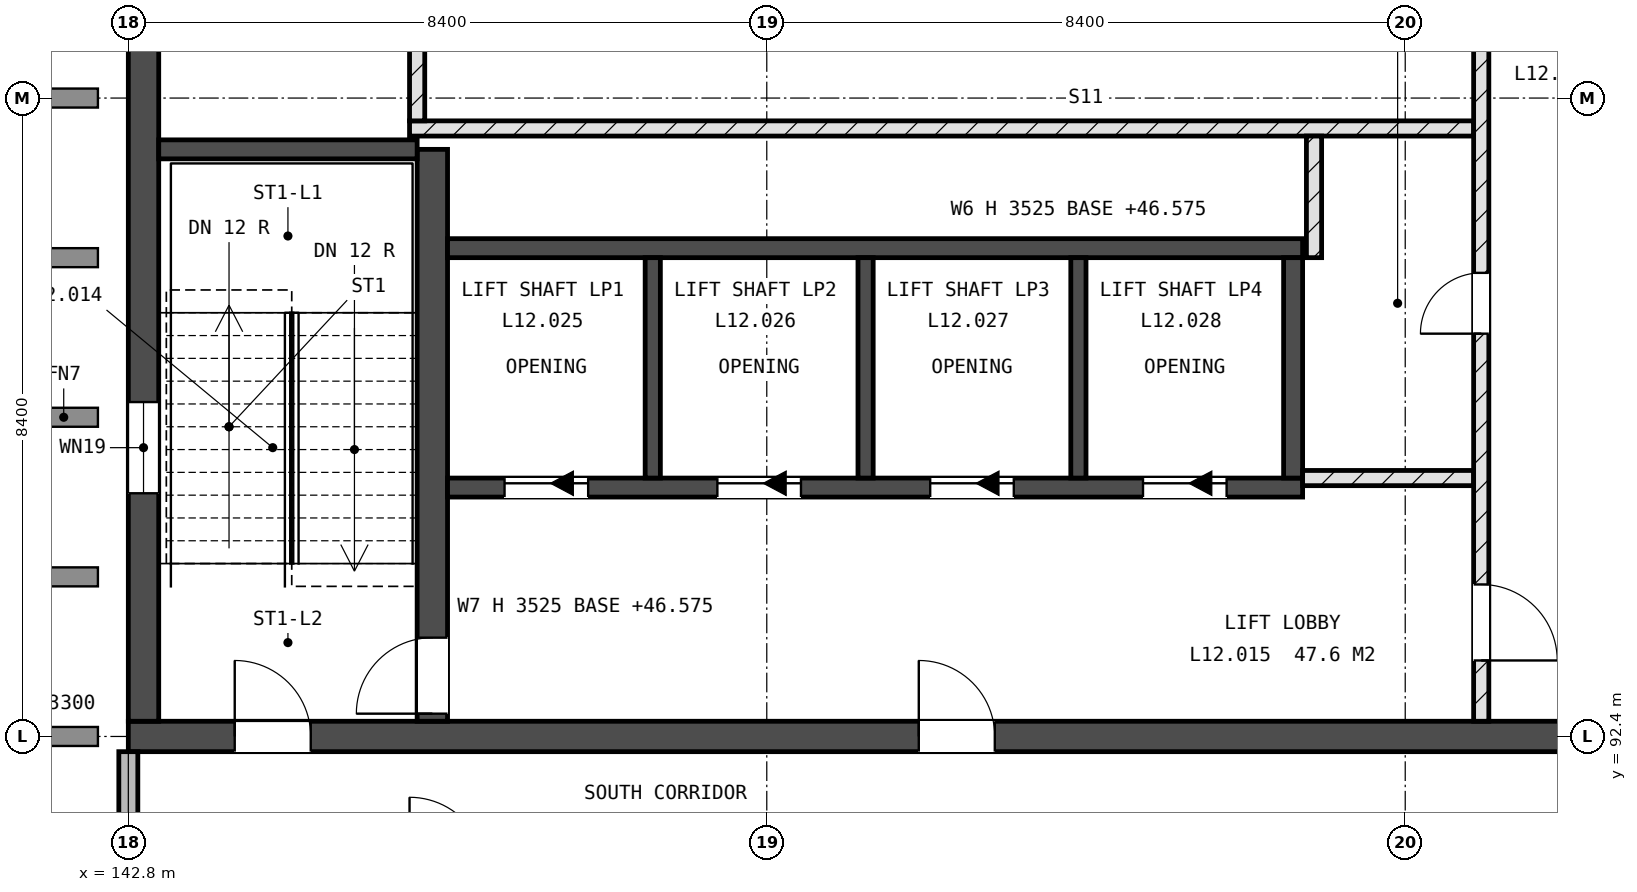
"""IFC4 building model, lengths in metres.
Left out: names, types, materials, properties, quantities, classifications, styles, units other than length and angle.
Written with IfcOpenShell. Run it as: python <this file> out.ifc"""

import sys

from ifc_helpers import new_model, si_unit, direction, frame, frame_2d, origin, place, context, subcontext, project, spatial, rectangle, extrude, element, fill, save


model = new_model("IFC4")
c1 = context("Model", 3, precision=1e-05, world=origin(), true_north=direction((0.0, 1.0)))
c2 = subcontext(c1, "Body", "Model", "MODEL_VIEW")
j1 = project(units=[si_unit("LENGTHUNIT", "METRE"), si_unit("PLANEANGLEUNIT", "RADIAN")], contexts=[c1])
p1 = place(None, origin())
s1 = spatial("IfcSite", under=j1, at=p1, CompositionType="ELEMENT")
p2 = place(p1, origin())
s2 = spatial("IfcBuilding", under=s1, at=p2, CompositionType="ELEMENT")
p3 = place(p2, frame((0.0, 0.0, 46.8)))
s3 = spatial("IfcBuildingStorey", under=s2, at=p3, CompositionType="ELEMENT", Elevation=46.8)
p4 = place(p3, frame((142.8, 92.4, -0.225), z_axis=(0.0, 0.0, 1.0), x_axis=(1.0, 0.0, 0.0)))
e1 = element("IfcWall", 1, at=p4, inside=s3, PredefinedType="SHEAR", context=c2, shape_type="SweptSolid", body=[
    extrude(rectangle(XDim=25.2, YDim=0.4, at=frame_2d((12.6, 0.0))), origin(), (0.0, 0.0, 1.0), 3.525),
])
p5 = place(p4, frame((1.4, 0.0, 0.225)))
e2 = element("IfcOpeningElement", 2, at=p5, cuts=e1, PredefinedType="OPENING", context=c2, shape_type="SweptSolid", body=[
    extrude(rectangle(XDim=1.0, YDim=2.1, at=frame_2d((0.5, 1.05))), frame((0.0, 0.21, 0.0), z_axis=(0.0, -1.0, 0.0), x_axis=(1.0, 0.0, 0.0)), (0.0, 0.0, 1.0), 0.42),
])
p6 = place(p4, frame((19.1, 0.0, 0.225)))
e3 = element("IfcOpeningElement", 3, at=p6, cuts=e1, PredefinedType="OPENING", context=c2, shape_type="SweptSolid", body=[
    extrude(rectangle(XDim=1.0, YDim=2.1, at=frame_2d((0.5, 1.05))), frame((0.0, 0.21, 0.0), z_axis=(0.0, -1.0, 0.0), x_axis=(1.0, 0.0, 0.0)), (0.0, 0.0, 1.0), 0.42),
])
p7 = place(p4, frame((10.4, 0.0, 0.225)))
e4 = element("IfcOpeningElement", 4, at=p7, cuts=e1, PredefinedType="OPENING", context=c2, shape_type="SweptSolid", body=[
    extrude(rectangle(XDim=1.0, YDim=2.1, at=frame_2d((0.5, 1.05))), frame((0.0, 0.21, 0.0), z_axis=(0.0, -1.0, 0.0), x_axis=(1.0, 0.0, 0.0)), (0.0, 0.0, 1.0), 0.42),
])
p8 = place(p3, frame((143.0, 92.6, -0.225), z_axis=(0.0, 0.0, 1.0), x_axis=(0.0, 1.0, 0.0)))
e5 = element("IfcWall", 5, at=p8, inside=s3, PredefinedType="SHEAR", context=c2, shape_type="SweptSolid", body=[
    extrude(rectangle(XDim=16.4, YDim=0.4, at=frame_2d((8.2, 0.0))), origin(), (0.0, 0.0, 1.0), 3.525),
])
p9 = place(p8, frame((3.0, 0.0, 1.825)))
e6 = element("IfcOpeningElement", 6, at=p9, cuts=e5, PredefinedType="OPENING", context=c2, shape_type="SweptSolid", body=[
    extrude(rectangle(XDim=1.2, YDim=0.9, at=frame_2d((0.6, 0.45))), frame((0.0, 0.21, 0.0), z_axis=(0.0, -1.0, 0.0), x_axis=(1.0, 0.0, 0.0)), (0.0, 0.0, 1.0), 0.42),
])
p10 = place(p3, frame((146.8, 92.6, -0.225), z_axis=(0.0, 0.0, 1.0), x_axis=(0.0, 1.0, 0.0)))
e7 = element("IfcWall", 7, at=p10, inside=s3, PredefinedType="SHEAR", context=c2, shape_type="SweptSolid", body=[
    extrude(rectangle(XDim=7.525, YDim=0.4, at=frame_2d((3.762, 0.0))), origin(), (0.0, 0.0, 1.0), 3.525),
])
p11 = place(p10, frame((0.1, 0.0, 0.225)))
e8 = element("IfcOpeningElement", 8, at=p11, cuts=e7, PredefinedType="OPENING", context=c2, shape_type="SweptSolid", body=[
    extrude(rectangle(XDim=1.0, YDim=2.1, at=frame_2d((0.5, 1.05))), frame((0.0, 0.21, 0.0), z_axis=(0.0, -1.0, 0.0), x_axis=(1.0, 0.0, 0.0)), (0.0, 0.0, 1.0), 0.42),
])
p12 = place(p3, frame((143.2, 100.125, -0.225), z_axis=(0.0, 0.0, 1.0), x_axis=(1.0, 0.0, 0.0)))
e9 = element("IfcWall", 9, at=p12, inside=s3, PredefinedType="SHEAR", context=c2, shape_type="SweptSolid", body=[
    extrude(rectangle(XDim=3.4, YDim=0.25, at=frame_2d((1.7, 0.0))), origin(), (0.0, 0.0, 1.0), 3.525),
])
p13 = place(p3, frame((147.0, 95.675, -0.225), z_axis=(0.0, 0.0, 1.0), x_axis=(1.0, 0.0, 0.0)))
e10 = element("IfcWall", 10, at=p13, inside=s3, PredefinedType="SHEAR", context=c2, shape_type="SweptSolid", body=[
    extrude(rectangle(XDim=11.25, YDim=0.25, at=frame_2d((5.625, 0.0))), origin(), (0.0, 0.0, 1.0), 3.525),
])
p14 = place(p13, frame((0.75, 0.0, 0.225)))
e11 = element("IfcOpeningElement", 11, at=p14, cuts=e10, PredefinedType="OPENING", context=c2, shape_type="SweptSolid", body=[
    extrude(rectangle(XDim=1.1, YDim=2.1, at=frame_2d((0.55, 1.05))), frame((0.0, 0.135, 0.0), z_axis=(0.0, -1.0, 0.0), x_axis=(1.0, 0.0, 0.0)), (0.0, 0.0, 1.0), 0.27),
])
p15 = place(p13, frame((3.55, 0.0, 0.225)))
e12 = element("IfcOpeningElement", 12, at=p15, cuts=e10, PredefinedType="OPENING", context=c2, shape_type="SweptSolid", body=[
    extrude(rectangle(XDim=1.1, YDim=2.1, at=frame_2d((0.55, 1.05))), frame((0.0, 0.135, 0.0), z_axis=(0.0, -1.0, 0.0), x_axis=(1.0, 0.0, 0.0)), (0.0, 0.0, 1.0), 0.27),
])
p16 = place(p13, frame((6.35, 0.0, 0.225)))
e13 = element("IfcOpeningElement", 13, at=p16, cuts=e10, PredefinedType="OPENING", context=c2, shape_type="SweptSolid", body=[
    extrude(rectangle(XDim=1.1, YDim=2.1, at=frame_2d((0.55, 1.05))), frame((0.0, 0.135, 0.0), z_axis=(0.0, -1.0, 0.0), x_axis=(1.0, 0.0, 0.0)), (0.0, 0.0, 1.0), 0.27),
])
p17 = place(p13, frame((9.15, 0.0, 0.225)))
e14 = element("IfcOpeningElement", 14, at=p17, cuts=e10, PredefinedType="OPENING", context=c2, shape_type="SweptSolid", body=[
    extrude(rectangle(XDim=1.1, YDim=2.1, at=frame_2d((0.55, 1.05))), frame((0.0, 0.135, 0.0), z_axis=(0.0, -1.0, 0.0), x_axis=(1.0, 0.0, 0.0)), (0.0, 0.0, 1.0), 0.27),
])
p18 = place(p3, frame((147.0, 98.825, -0.225), z_axis=(0.0, 0.0, 1.0), x_axis=(1.0, 0.0, 0.0)))
e15 = element("IfcWall", 15, at=p18, inside=s3, PredefinedType="SHEAR", context=c2, shape_type="SweptSolid", body=[
    extrude(rectangle(XDim=11.25, YDim=0.25, at=frame_2d((5.625, 0.0))), origin(), (0.0, 0.0, 1.0), 3.525),
])
p19 = place(p3, frame((158.125, 95.8, -0.225), z_axis=(0.0, 0.0, 1.0), x_axis=(0.0, 1.0, 0.0)))
e16 = element("IfcWall", 16, at=p19, inside=s3, PredefinedType="SHEAR", context=c2, shape_type="SweptSolid", body=[
    extrude(rectangle(XDim=2.9, YDim=0.25, at=frame_2d((1.45, 0.0))), origin(), (0.0, 0.0, 1.0), 3.525),
])
for number, where, z_axis, x_axis in (
    (17, (149.7, 95.8, -0.225), (0.0, 0.0, 1.0), (0.0, 1.0, 0.0)),
    (18, (152.5, 95.8, -0.225), (0.0, 0.0, 1.0), (0.0, 1.0, 0.0)),
    (19, (155.3, 95.8, -0.225), (0.0, 0.0, 1.0), (0.0, 1.0, 0.0)),
):
    element("IfcWall", number, at=place(p3, frame(where, z_axis=z_axis, x_axis=x_axis)), inside=s3, PredefinedType="SHEAR", context=c2, shape_type="SweptSolid", body=[
        extrude(rectangle(XDim=2.9, YDim=0.2, at=frame_2d((1.45, 0.0))), origin(), (0.0, 0.0, 1.0), 3.525),
    ])
p20 = place(p3, frame((142.8, 84.4, 0.0), z_axis=(0.0, 0.0, 1.0), x_axis=(0.0, 1.0, 0.0)))
e20 = element("IfcWall", 20, at=p20, inside=s3, PredefinedType="STANDARD", context=c2, shape_type="SweptSolid", body=[
    extrude(rectangle(XDim=7.8, YDim=0.25, at=frame_2d((3.9, 0.0))), origin(), (0.0, 0.0, 1.0), 3.3),
])
p21 = place(p20, frame((2.3, 0.0, 2.1)))
e21 = element("IfcOpeningElement", 21, at=p21, cuts=e20, PredefinedType="OPENING", context=c2, shape_type="SweptSolid", body=[
    extrude(rectangle(XDim=0.9, YDim=0.6, at=frame_2d((0.45, 0.3))), frame((0.0, 0.135, 0.0), z_axis=(0.0, -1.0, 0.0), x_axis=(1.0, 0.0, 0.0)), (0.0, 0.0, 1.0), 0.27),
])
p22 = place(p3, frame((158.25, 95.8, 0.0), z_axis=(0.0, 0.0, 1.0), x_axis=(1.0, 0.0, 0.0)))
e22 = element("IfcWall", 22, at=p22, inside=s3, PredefinedType="SOLIDWALL", context=c2, shape_type="SweptSolid", body=[
    extrude(rectangle(XDim=2.25, YDim=0.2, at=frame_2d((1.125, 0.0))), origin(), (0.0, 0.0, 1.0), 3.3),
])
p23 = place(p3, frame((146.5, 100.4, 0.0), z_axis=(0.0, 0.0, 1.0), x_axis=(1.0, 0.0, 0.0)))
e23 = element("IfcWall", 23, at=p23, inside=s3, PredefinedType="SOLIDWALL", context=c2, shape_type="SweptSolid", body=[
    extrude(rectangle(XDim=14.0, YDim=0.2, at=frame_2d((7.0, 0.0))), origin(), (0.0, 0.0, 1.0), 3.3),
])
p24 = place(p3, frame((146.6, 100.5, 0.0), z_axis=(0.0, 0.0, 1.0), x_axis=(0.0, 1.0, 0.0)))
e24 = element("IfcWall", 24, at=p24, inside=s3, PredefinedType="SOLIDWALL", context=c2, shape_type="SweptSolid", body=[
    extrude(rectangle(XDim=5.3, YDim=0.2, at=frame_2d((2.65, 0.0))), origin(), (0.0, 0.0, 1.0), 3.3),
])
p25 = place(p24, frame((1.8, 0.0, 0.0)))
e25 = element("IfcOpeningElement", 25, at=p25, cuts=e24, PredefinedType="OPENING", context=c2, shape_type="SweptSolid", body=[
    extrude(rectangle(XDim=1.0, YDim=2.1, at=frame_2d((0.5, 1.05))), frame((0.0, 0.11, 0.0), z_axis=(0.0, -1.0, 0.0), x_axis=(1.0, 0.0, 0.0)), (0.0, 0.0, 1.0), 0.22),
])
p26 = place(p3, frame((158.4, 98.7, 0.0), z_axis=(0.0, 0.0, 1.0), x_axis=(0.0, 1.0, 0.0)))
e26 = element("IfcWall", 26, at=p26, inside=s3, PredefinedType="SOLIDWALL", context=c2, shape_type="SweptSolid", body=[
    extrude(rectangle(XDim=1.6, YDim=0.2, at=frame_2d((0.8, 0.0))), origin(), (0.0, 0.0, 1.0), 3.3),
])
p27 = place(p3, frame((160.6, 92.6, 0.0), z_axis=(0.0, 0.0, 1.0), x_axis=(0.0, 1.0, 0.0)))
e27 = element("IfcWall", 27, at=p27, inside=s3, PredefinedType="SOLIDWALL", context=c2, shape_type="SweptSolid", body=[
    extrude(rectangle(XDim=12.5, YDim=0.2, at=frame_2d((6.25, 0.0))), origin(), (0.0, 0.0, 1.0), 3.3),
])
p28 = place(p27, frame((5.1, 0.0, 0.0)))
e28 = element("IfcOpeningElement", 28, at=p28, cuts=e27, PredefinedType="OPENING", context=c2, shape_type="SweptSolid", body=[
    extrude(rectangle(XDim=0.8, YDim=2.1, at=frame_2d((0.4, 1.05))), frame((0.0, 0.11, 0.0), z_axis=(0.0, -1.0, 0.0), x_axis=(1.0, 0.0, 0.0)), (0.0, 0.0, 1.0), 0.22),
])
p29 = place(p27, frame((0.8, 0.0, 0.0)))
e29 = element("IfcOpeningElement", 29, at=p29, cuts=e27, PredefinedType="OPENING", context=c2, shape_type="SweptSolid", body=[
    extrude(rectangle(XDim=1.0, YDim=2.1, at=frame_2d((0.5, 1.05))), frame((0.0, 0.11, 0.0), z_axis=(0.0, -1.0, 0.0), x_axis=(1.0, 0.0, 0.0)), (0.0, 0.0, 1.0), 0.22),
])
p30 = place(p9, origin())
e30 = element("IfcWindow", 30, at=p30, inside=s3, PartitioningType="SINGLE_PANEL", PredefinedType="WINDOW", context=c2, shape_type="SweptSolid", body=[
    extrude(rectangle(XDim=1.2, YDim=0.9, at=frame_2d((0.6, 0.45))), frame((0.0, 0.03, 0.0), z_axis=(0.0, -1.0, 0.0), x_axis=(1.0, 0.0, 0.0)), (0.0, 0.0, 1.0), 0.06),
])
fill(e6, e30)
p31 = place(p14, origin())
e31 = element("IfcDoor", 31, at=p31, inside=s3, OperationType="SLIDING_TO_LEFT", PredefinedType="DOOR", context=c2, shape_type="SweptSolid", body=[
    extrude(rectangle(XDim=1.1, YDim=2.1, at=frame_2d((0.55, 1.05))), frame((0.0, 0.025, 0.0), z_axis=(0.0, -1.0, 0.0), x_axis=(1.0, 0.0, 0.0)), (0.0, 0.0, 1.0), 0.05),
])
fill(e11, e31)
p32 = place(p15, origin())
e32 = element("IfcDoor", 32, at=p32, inside=s3, OperationType="SLIDING_TO_LEFT", PredefinedType="DOOR", context=c2, shape_type="SweptSolid", body=[
    extrude(rectangle(XDim=1.1, YDim=2.1, at=frame_2d((0.55, 1.05))), frame((0.0, 0.025, 0.0), z_axis=(0.0, -1.0, 0.0), x_axis=(1.0, 0.0, 0.0)), (0.0, 0.0, 1.0), 0.05),
])
fill(e12, e32)
p33 = place(p16, origin())
e33 = element("IfcDoor", 33, at=p33, inside=s3, OperationType="SLIDING_TO_LEFT", PredefinedType="DOOR", context=c2, shape_type="SweptSolid", body=[
    extrude(rectangle(XDim=1.1, YDim=2.1, at=frame_2d((0.55, 1.05))), frame((0.0, 0.025, 0.0), z_axis=(0.0, -1.0, 0.0), x_axis=(1.0, 0.0, 0.0)), (0.0, 0.0, 1.0), 0.05),
])
fill(e13, e33)
p34 = place(p17, origin())
e34 = element("IfcDoor", 34, at=p34, inside=s3, OperationType="SLIDING_TO_LEFT", PredefinedType="DOOR", context=c2, shape_type="SweptSolid", body=[
    extrude(rectangle(XDim=1.1, YDim=2.1, at=frame_2d((0.55, 1.05))), frame((0.0, 0.025, 0.0), z_axis=(0.0, -1.0, 0.0), x_axis=(1.0, 0.0, 0.0)), (0.0, 0.0, 1.0), 0.05),
])
fill(e14, e34)
p35 = place(p5, origin())
e35 = element("IfcDoor", 35, at=p35, inside=s3, OperationType="SINGLE_SWING_RIGHT", PredefinedType="DOOR", context=c2, shape_type="SweptSolid", body=[
    extrude(rectangle(XDim=1.0, YDim=2.1, at=frame_2d((0.5, 1.05))), frame((0.0, 0.025, 0.0), z_axis=(0.0, -1.0, 0.0), x_axis=(1.0, 0.0, 0.0)), (0.0, 0.0, 1.0), 0.05),
])
fill(e2, e35)
p36 = place(p11, origin())
e36 = element("IfcDoor", 36, at=p36, inside=s3, OperationType="SINGLE_SWING_RIGHT", PredefinedType="DOOR", context=c2, shape_type="SweptSolid", body=[
    extrude(rectangle(XDim=1.0, YDim=2.1, at=frame_2d((0.5, 1.05))), frame((0.0, 0.025, 0.0), z_axis=(0.0, -1.0, 0.0), x_axis=(1.0, 0.0, 0.0)), (0.0, 0.0, 1.0), 0.05),
])
fill(e8, e36)
p37 = place(p28, origin())
e37 = element("IfcDoor", 37, at=p37, inside=s3, OperationType="SINGLE_SWING_RIGHT", PredefinedType="DOOR", context=c2, shape_type="SweptSolid", body=[
    extrude(rectangle(XDim=0.8, YDim=2.1, at=frame_2d((0.4, 1.05))), frame((0.0, 0.025, 0.0), z_axis=(0.0, -1.0, 0.0), x_axis=(1.0, 0.0, 0.0)), (0.0, 0.0, 1.0), 0.05),
])
fill(e28, e37)
p38 = place(p7, origin())
e38 = element("IfcDoor", 38, at=p38, inside=s3, OperationType="SINGLE_SWING_RIGHT", PredefinedType="DOOR", context=c2, shape_type="SweptSolid", body=[
    extrude(rectangle(XDim=1.0, YDim=2.1, at=frame_2d((0.5, 1.05))), frame((0.0, 0.025, 0.0), z_axis=(0.0, -1.0, 0.0), x_axis=(1.0, 0.0, 0.0)), (0.0, 0.0, 1.0), 0.05),
])
fill(e4, e38)
p39 = place(p29, origin())
e39 = element("IfcDoor", 39, at=p39, inside=s3, OperationType="SINGLE_SWING_LEFT", PredefinedType="DOOR", context=c2, shape_type="SweptSolid", body=[
    extrude(rectangle(XDim=1.0, YDim=2.1, at=frame_2d((0.5, 1.05))), frame((0.0, 0.025, 0.0), z_axis=(0.0, -1.0, 0.0), x_axis=(1.0, 0.0, 0.0)), (0.0, 0.0, 1.0), 0.05),
])
fill(e29, e39)
save(model, sys.argv[1])
